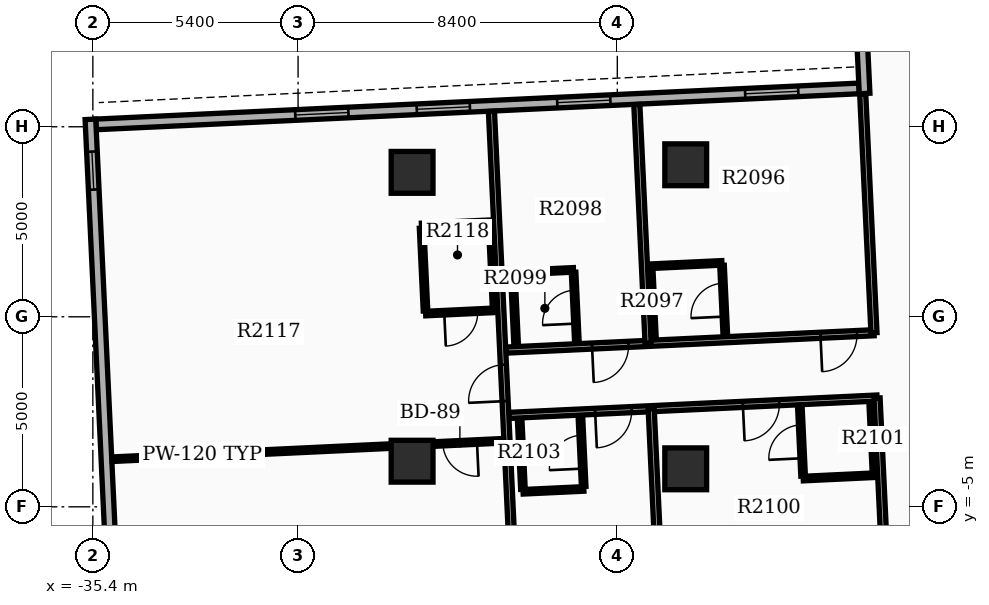
"""IFC4 building model, lengths in metres.
Left out: names, types, materials, properties, quantities, classifications, styles, units other than length and angle.
Written with IfcOpenShell. Run it as: python <this file> out.ifc"""

import sys

from ifc_helpers import new_model, si_unit, direction, frame, frame_2d, origin, origin_2d, place, context, subcontext, project, spatial, rectangle, extrude, element, fill, save


model = new_model("IFC4")
c1 = context("Model", 3, precision=1e-05, world=origin(), true_north=direction((0.0, 1.0)))
c2 = subcontext(c1, "Body", "Model", "MODEL_VIEW")
j1 = project(units=[si_unit("LENGTHUNIT", "METRE"), si_unit("PLANEANGLEUNIT", "RADIAN")], contexts=[c1])
p1 = place(None, origin())
s1 = spatial("IfcSite", under=j1, at=p1, CompositionType="ELEMENT")
p2 = place(p1, origin())
s2 = spatial("IfcBuilding", under=s1, at=p2, CompositionType="ELEMENT")
p3 = place(p2, frame((0.0, 0.0, 132.0)))
s3 = spatial("IfcBuildingStorey", under=s2, at=p3, CompositionType="ELEMENT", Elevation=132.0)
for number, where, z_axis, x_axis in (
    (1, (-19.8, -4.0, 0.0), (0.0, 0.0, 1.0), (1.0, 0.0, 0.0)),
    (2, (-19.8, 4.0, 0.0), (0.0, 0.0, 1.0), (1.0, 0.0, 0.0)),
    (3, (-27.0, -3.8, 0.0), (0.0, 0.0, 1.0), (1.0, 0.0, 0.0)),
    (4, (-27.0, 3.8, 0.0), (0.0, 0.0, 1.0), (1.0, 0.0, 0.0)),
):
    element("IfcColumn", number, at=place(p3, frame(where, z_axis=z_axis, x_axis=x_axis)), inside=s3, PredefinedType="COLUMN", context=c2, shape_type="SweptSolid", body=[
        extrude(rectangle(XDim=1.1, YDim=1.1, at=origin_2d()), origin(), (0.0, 0.0, 1.0), 3.9),
    ])
p4 = place(p3, frame((-15.24, 6.009, 0.0), z_axis=(0.0, 0.0, 1.0), x_axis=(-0.998890015344, -0.047103473814, 0.0)))
e5 = element("IfcWall", 5, at=p4, inside=s3, PredefinedType="STANDARD", context=c2, shape_type="SweptSolid", body=[
    extrude(rectangle(XDim=20.1, YDim=0.28, at=frame_2d((10.05, 0.0))), origin(), (0.0, 0.0, 1.0), 2.97),
])
p5 = place(p4, frame((1.6, 0.0, 0.8)))
e6 = element("IfcOpeningElement", 6, at=p5, cuts=e5, PredefinedType="OPENING", context=c2, shape_type="SweptSolid", body=[
    extrude(rectangle(XDim=1.4, YDim=1.6, at=frame_2d((0.7, 0.8))), frame((0.0, 0.15, 0.0), z_axis=(0.0, -1.0, 0.0), x_axis=(1.0, 0.0, 0.0)), (0.0, 0.0, 1.0), 0.3),
])
p6 = place(p4, frame((6.55, 0.0, 0.8)))
e7 = element("IfcOpeningElement", 7, at=p6, cuts=e5, PredefinedType="OPENING", context=c2, shape_type="SweptSolid", body=[
    extrude(rectangle(XDim=1.4, YDim=1.6, at=frame_2d((0.7, 0.8))), frame((0.0, 0.15, 0.0), z_axis=(0.0, -1.0, 0.0), x_axis=(1.0, 0.0, 0.0)), (0.0, 0.0, 1.0), 0.3),
])
p7 = place(p4, frame((10.25, 0.0, 0.8)))
e8 = element("IfcOpeningElement", 8, at=p7, cuts=e5, PredefinedType="OPENING", context=c2, shape_type="SweptSolid", body=[
    extrude(rectangle(XDim=1.4, YDim=1.6, at=frame_2d((0.7, 0.8))), frame((0.0, 0.15, 0.0), z_axis=(0.0, -1.0, 0.0), x_axis=(1.0, 0.0, 0.0)), (0.0, 0.0, 1.0), 0.3),
])
p8 = place(p4, frame((13.45, 0.0, 0.8)))
e9 = element("IfcOpeningElement", 9, at=p8, cuts=e5, PredefinedType="OPENING", context=c2, shape_type="SweptSolid", body=[
    extrude(rectangle(XDim=1.4, YDim=1.6, at=frame_2d((0.7, 0.8))), frame((0.0, 0.15, 0.0), z_axis=(0.0, -1.0, 0.0), x_axis=(1.0, 0.0, 0.0)), (0.0, 0.0, 1.0), 0.3),
])
p9 = place(p3, frame((-35.464, 5.195, 0.0), z_axis=(0.0, 0.0, 1.0), x_axis=(0.047101845086, -0.998890092147, 0.0)))
e10 = element("IfcWall", 10, at=p9, inside=s3, PredefinedType="STANDARD", context=c2, shape_type="SweptSolid", body=[
    extrude(rectangle(XDim=13.72, YDim=0.28, at=frame_2d((6.86, 0.0))), origin(), (0.0, 0.0, 1.0), 2.97),
])
p10 = place(p9, frame((0.85, 0.0, 0.85)))
e11 = element("IfcOpeningElement", 11, at=p10, cuts=e10, PredefinedType="OPENING", context=c2, shape_type="SweptSolid", body=[
    extrude(rectangle(XDim=1.0, YDim=1.5, at=frame_2d((0.5, 0.75))), frame((0.0, 0.15, 0.0), z_axis=(0.0, -1.0, 0.0), x_axis=(1.0, 0.0, 0.0)), (0.0, 0.0, 1.0), 0.3),
])
p11 = place(p3, frame((-15.094, 5.875, 0.0), z_axis=(0.0, 0.0, 1.0), x_axis=(-0.04712043756, 0.998889215261, 0.0)))
e12 = element("IfcWall", 12, at=p11, inside=s3, PredefinedType="STANDARD", context=c2, shape_type="SweptSolid", body=[
    extrude(rectangle(XDim=6.86, YDim=0.28, at=frame_2d((3.43, 0.0))), origin(), (0.0, 0.0, 1.0), 2.97),
])
p12 = place(p3, frame((-14.847, -0.42, 0.0), z_axis=(0.0, 0.0, 1.0), x_axis=(-0.998890575268, -0.047091598416, 0.0)))
e13 = element("IfcWall", 13, at=p12, inside=s3, PredefinedType="PARTITIONING", context=c2, shape_type="SweptSolid", body=[
    extrude(rectangle(XDim=9.7, YDim=0.16, at=frame_2d((4.85, 0.0))), origin(), (0.0, 0.0, 1.0), 2.96),
])
p13 = place(p12, frame((0.45, 0.0, 0.0)))
e14 = element("IfcOpeningElement", 14, at=p13, cuts=e13, PredefinedType="OPENING", context=c2, shape_type="SweptSolid", body=[
    extrude(rectangle(XDim=0.96, YDim=2.15, at=frame_2d((0.48, 1.075))), frame((0.0, 0.09, 0.0), z_axis=(0.0, -1.0, 0.0), x_axis=(1.0, 0.0, 0.0)), (0.0, 0.0, 1.0), 0.18),
])
p14 = place(p12, frame((6.467, 0.0, 0.0)))
e15 = element("IfcOpeningElement", 15, at=p14, cuts=e13, PredefinedType="OPENING", context=c2, shape_type="SweptSolid", body=[
    extrude(rectangle(XDim=0.96, YDim=2.15, at=frame_2d((0.48, 1.075))), frame((0.0, 0.09, 0.0), z_axis=(0.0, -1.0, 0.0), x_axis=(1.0, 0.0, 0.0)), (0.0, 0.0, 1.0), 0.18),
])
for number, where, z_axis, x_axis in (
    (16, (-14.847, -0.42, 0.0), (0.0, 0.0, 1.0), (-0.047, 0.999, 0.0)),
    (17, (-20.79, -0.7, 0.0), (0.0, 0.0, 1.0), (-0.047, 0.999, 0.0)),
):
    element("IfcWall", number, at=place(p3, frame(where, z_axis=z_axis, x_axis=x_axis)), inside=s3, PredefinedType="PARTITIONING", context=c2, shape_type="SweptSolid", body=[
        extrude(rectangle(XDim=6.292, YDim=0.16, at=frame_2d((3.146, 0.0))), origin(), (0.0, 0.0, 1.0), 2.96),
    ])
p15 = place(p3, frame((-18.759, -0.464, 0.0), z_axis=(0.0, 0.0, 1.0), x_axis=(-0.047087116047, 0.998890786574, 0.0)))
e18 = element("IfcWall", 18, at=p15, inside=s3, PredefinedType="PARTITIONING", context=c2, shape_type="SweptSolid", body=[
    extrude(rectangle(XDim=1.82, YDim=0.12, at=frame_2d((0.91, 0.0))), origin(), (0.0, 0.0, 1.0), 2.96),
])
p16 = place(p15, frame((0.47, 0.0, 0.0)))
e19 = element("IfcOpeningElement", 19, at=p16, cuts=e18, PredefinedType="OPENING", context=c2, shape_type="SweptSolid", body=[
    extrude(rectangle(XDim=0.88, YDim=2.1, at=frame_2d((0.44, 1.05))), frame((0.0, 0.07, 0.0), z_axis=(0.0, -1.0, 0.0), x_axis=(1.0, 0.0, 0.0)), (0.0, 0.0, 1.0), 0.14),
])
p17 = place(p3, frame((-20.637, -0.553, 0.0), z_axis=(0.0, 0.0, 1.0), x_axis=(-0.047087116047, 0.998890786574, 0.0)))
e20 = element("IfcWall", 20, at=p17, inside=s3, PredefinedType="PARTITIONING", context=c2, shape_type="SweptSolid", body=[
    extrude(rectangle(XDim=1.82, YDim=0.12, at=frame_2d((0.91, 0.0))), origin(), (0.0, 0.0, 1.0), 2.96),
])
p18 = place(p3, frame((-18.848, 1.419, 0.0), z_axis=(0.0, 0.0, 1.0), x_axis=(-0.998888030748, -0.047145540913, 0.0)))
e21 = element("IfcWall", 21, at=p18, inside=s3, PredefinedType="PARTITIONING", context=c2, shape_type="SweptSolid", body=[
    extrude(rectangle(XDim=1.88, YDim=0.12, at=frame_2d((0.94, 0.0))), origin(), (0.0, 0.0, 1.0), 2.96),
])
p19 = place(p3, frame((-22.665, -0.648, 0.0), z_axis=(0.0, 0.0, 1.0), x_axis=(-0.047214641863, 0.998884766924, 0.0)))
e22 = element("IfcWall", 22, at=p19, inside=s3, PredefinedType="PARTITIONING", context=c2, shape_type="SweptSolid", body=[
    extrude(rectangle(XDim=1.82, YDim=0.12, at=frame_2d((0.91, 0.0))), origin(), (0.0, 0.0, 1.0), 2.96),
])
p20 = place(p19, frame((0.47, 0.0, 0.0)))
e23 = element("IfcOpeningElement", 23, at=p20, cuts=e22, PredefinedType="OPENING", context=c2, shape_type="SweptSolid", body=[
    extrude(rectangle(XDim=0.88, YDim=2.1, at=frame_2d((0.44, 1.05))), frame((0.0, 0.07, 0.0), z_axis=(0.0, -1.0, 0.0), x_axis=(1.0, 0.0, 0.0)), (0.0, 0.0, 1.0), 0.14),
])
p21 = place(p3, frame((-24.263, -0.724, 0.0), z_axis=(0.0, 0.0, 1.0), x_axis=(-0.047220968666, 0.998884467853, 0.0)))
e24 = element("IfcWall", 24, at=p21, inside=s3, PredefinedType="PARTITIONING", context=c2, shape_type="SweptSolid", body=[
    extrude(rectangle(XDim=1.82, YDim=0.12, at=frame_2d((0.91, 0.0))), origin(), (0.0, 0.0, 1.0), 2.96),
])
p22 = place(p3, frame((-22.753, 1.235, 0.0), z_axis=(0.0, 0.0, 1.0), x_axis=(-0.998887730798, -0.047151895633, 0.0)))
e25 = element("IfcWall", 25, at=p22, inside=s3, PredefinedType="PARTITIONING", context=c2, shape_type="SweptSolid", body=[
    extrude(rectangle(XDim=1.6, YDim=0.12, at=frame_2d((0.8, 0.0))), origin(), (0.0, 0.0, 1.0), 2.96),
])
p23 = place(p3, frame((-14.766, -2.138, 0.0), z_axis=(0.0, 0.0, 1.0), x_axis=(-0.99888939101, -0.047116711769, 0.0)))
e26 = element("IfcWall", 26, at=p23, inside=s3, PredefinedType="PARTITIONING", context=c2, shape_type="SweptSolid", body=[
    extrude(rectangle(XDim=9.7, YDim=0.16, at=frame_2d((4.85, 0.0))), origin(), (0.0, 0.0, 1.0), 2.96),
])
p24 = place(p23, frame((2.575, 0.0, 0.0)))
e27 = element("IfcOpeningElement", 27, at=p24, cuts=e26, PredefinedType="OPENING", context=c2, shape_type="SweptSolid", body=[
    extrude(rectangle(XDim=0.96, YDim=2.15, at=frame_2d((0.48, 1.075))), frame((0.0, 0.09, 0.0), z_axis=(0.0, -1.0, 0.0), x_axis=(1.0, 0.0, 0.0)), (0.0, 0.0, 1.0), 0.18),
])
p25 = place(p23, frame((6.467, 0.0, 0.0)))
e28 = element("IfcOpeningElement", 28, at=p25, cuts=e26, PredefinedType="OPENING", context=c2, shape_type="SweptSolid", body=[
    extrude(rectangle(XDim=0.96, YDim=2.15, at=frame_2d((0.48, 1.075))), frame((0.0, 0.09, 0.0), z_axis=(0.0, -1.0, 0.0), x_axis=(1.0, 0.0, 0.0)), (0.0, 0.0, 1.0), 0.18),
])
p26 = place(p3, frame((-14.766, -2.138, 0.0), z_axis=(0.0, 0.0, 1.0), x_axis=(0.047095033298, -0.998890413328, 0.0)))
e29 = element("IfcWall", 29, at=p26, inside=s3, PredefinedType="PARTITIONING", context=c2, shape_type="SweptSolid", body=[
    extrude(rectangle(XDim=5.132, YDim=0.16, at=frame_2d((2.566, 0.0))), origin(), (0.0, 0.0, 1.0), 2.96),
])
p27 = place(p3, frame((-20.709, -2.418, 0.0), z_axis=(0.0, 0.0, 1.0), x_axis=(0.047097271264, -0.998890307811, 0.0)))
e30 = element("IfcWall", 30, at=p27, inside=s3, PredefinedType="PARTITIONING", context=c2, shape_type="SweptSolid", body=[
    extrude(rectangle(XDim=5.132, YDim=0.16, at=frame_2d((2.566, 0.0))), origin(), (0.0, 0.0, 1.0), 2.96),
])
p28 = place(p3, frame((-16.711, -4.192, 0.0), z_axis=(0.0, 0.0, 1.0), x_axis=(-0.047080807099, 0.998891083954, 0.0)))
e31 = element("IfcWall", 31, at=p28, inside=s3, PredefinedType="PARTITIONING", context=c2, shape_type="SweptSolid", body=[
    extrude(rectangle(XDim=1.82, YDim=0.12, at=frame_2d((0.91, 0.0))), origin(), (0.0, 0.0, 1.0), 2.96),
])
p29 = place(p28, frame((0.47, 0.0, 0.0)))
e32 = element("IfcOpeningElement", 32, at=p29, cuts=e31, PredefinedType="OPENING", context=c2, shape_type="SweptSolid", body=[
    extrude(rectangle(XDim=0.88, YDim=2.1, at=frame_2d((0.44, 1.05))), frame((0.0, 0.07, 0.0), z_axis=(0.0, -1.0, 0.0), x_axis=(1.0, 0.0, 0.0)), (0.0, 0.0, 1.0), 0.14),
])
p30 = place(p3, frame((-14.833, -4.103, 0.0), z_axis=(0.0, 0.0, 1.0), x_axis=(-0.047087116047, 0.998890786574, 0.0)))
e33 = element("IfcWall", 33, at=p30, inside=s3, PredefinedType="PARTITIONING", context=c2, shape_type="SweptSolid", body=[
    extrude(rectangle(XDim=1.82, YDim=0.12, at=frame_2d((0.91, 0.0))), origin(), (0.0, 0.0, 1.0), 2.96),
])
p31 = place(p3, frame((-14.83, -4.168, 0.0), z_axis=(0.0, 0.0, 1.0), x_axis=(-0.998888319371, -0.047139425368, 0.0)))
e34 = element("IfcWall", 34, at=p31, inside=s3, PredefinedType="PARTITIONING", context=c2, shape_type="SweptSolid", body=[
    extrude(rectangle(XDim=1.88, YDim=0.12, at=frame_2d((0.94, 0.0))), origin(), (0.0, 0.0, 1.0), 2.96),
])
p32 = place(p3, frame((-22.485, -4.464, 0.0), z_axis=(0.0, 0.0, 1.0), x_axis=(-0.047080807099, 0.998891083954, 0.0)))
e35 = element("IfcWall", 35, at=p32, inside=s3, PredefinedType="PARTITIONING", context=c2, shape_type="SweptSolid", body=[
    extrude(rectangle(XDim=1.82, YDim=0.12, at=frame_2d((0.91, 0.0))), origin(), (0.0, 0.0, 1.0), 2.96),
])
p33 = place(p32, frame((0.47, 0.0, 0.0)))
e36 = element("IfcOpeningElement", 36, at=p33, cuts=e35, PredefinedType="OPENING", context=c2, shape_type="SweptSolid", body=[
    extrude(rectangle(XDim=0.88, YDim=2.1, at=frame_2d((0.44, 1.05))), frame((0.0, 0.07, 0.0), z_axis=(0.0, -1.0, 0.0), x_axis=(1.0, 0.0, 0.0)), (0.0, 0.0, 1.0), 0.14),
])
p34 = place(p3, frame((-24.083, -4.54, 0.0), z_axis=(0.0, 0.0, 1.0), x_axis=(-0.047080807099, 0.998891083954, 0.0)))
e37 = element("IfcWall", 37, at=p34, inside=s3, PredefinedType="PARTITIONING", context=c2, shape_type="SweptSolid", body=[
    extrude(rectangle(XDim=1.82, YDim=0.12, at=frame_2d((0.91, 0.0))), origin(), (0.0, 0.0, 1.0), 2.96),
])
p35 = place(p3, frame((-22.482, -4.529, 0.0), z_axis=(0.0, 0.0, 1.0), x_axis=(-0.998887730798, -0.047151895633, 0.0)))
e38 = element("IfcWall", 38, at=p35, inside=s3, PredefinedType="PARTITIONING", context=c2, shape_type="SweptSolid", body=[
    extrude(rectangle(XDim=1.6, YDim=0.12, at=frame_2d((0.8, 0.0))), origin(), (0.0, 0.0, 1.0), 2.96),
])
p36 = place(p3, frame((-24.293, -7.725, 0.0), z_axis=(0.0, 0.0, 1.0), x_axis=(-0.047104484326, 0.998889967692, 0.0)))
e39 = element("IfcWall", 39, at=p36, inside=s3, PredefinedType="PARTITIONING", context=c2, shape_type="SweptSolid", body=[
    extrude(rectangle(XDim=13.144, YDim=0.16, at=frame_2d((6.572, 0.0))), origin(), (0.0, 0.0, 1.0), 2.96),
])
p37 = place(p36, frame((5.512, 0.0, 0.0)))
e40 = element("IfcOpeningElement", 40, at=p37, cuts=e39, PredefinedType="OPENING", context=c2, shape_type="SweptSolid", body=[
    extrude(rectangle(XDim=0.96, YDim=2.15, at=frame_2d((0.48, 1.075))), frame((0.0, 0.09, 0.0), z_axis=(0.0, -1.0, 0.0), x_axis=(1.0, 0.0, 0.0)), (0.0, 0.0, 1.0), 0.18),
])
p38 = place(p3, frame((-24.594, -3.262, 0.0), z_axis=(0.0, 0.0, 1.0), x_axis=(-0.998890681588, -0.047089343138, 0.0)))
e41 = element("IfcWall", 41, at=p38, inside=s3, PredefinedType="PARTITIONING", context=c2, shape_type="SweptSolid", body=[
    extrude(rectangle(XDim=10.312, YDim=0.12, at=frame_2d((5.156, 0.0))), origin(), (0.0, 0.0, 1.0), 2.96),
])
p39 = place(p38, frame((0.7, 0.0, 0.0)))
e42 = element("IfcOpeningElement", 42, at=p39, cuts=e41, PredefinedType="OPENING", context=c2, shape_type="SweptSolid", body=[
    extrude(rectangle(XDim=0.9, YDim=2.1, at=frame_2d((0.45, 1.05))), frame((0.0, 0.07, 0.0), z_axis=(0.0, -1.0, 0.0), x_axis=(1.0, 0.0, 0.0)), (0.0, 0.0, 1.0), 0.14),
])
p40 = place(p3, frame((-24.829, 0.241, 0.0), z_axis=(0.0, 0.0, 1.0), x_axis=(-0.047150103183, 0.998887815408, 0.0)))
e43 = element("IfcWall", 43, at=p40, inside=s3, PredefinedType="PARTITIONING", context=c2, shape_type="SweptSolid", body=[
    extrude(rectangle(XDim=2.18, YDim=0.12, at=frame_2d((1.09, 0.0))), origin(), (0.0, 0.0, 1.0), 2.96),
])
p41 = place(p3, frame((-26.647, 0.155, 0.0), z_axis=(0.0, 0.0, 1.0), x_axis=(-0.047033094092, 0.998893331673, 0.0)))
e44 = element("IfcWall", 44, at=p41, inside=s3, PredefinedType="PARTITIONING", context=c2, shape_type="SweptSolid", body=[
    extrude(rectangle(XDim=2.18, YDim=0.12, at=frame_2d((1.09, 0.0))), origin(), (0.0, 0.0, 1.0), 2.96),
])
p42 = place(p3, frame((-24.826, 0.171, 0.0), z_axis=(0.0, 0.0, 1.0), x_axis=(-0.998890786574, -0.047087116047, 0.0)))
e45 = element("IfcWall", 45, at=p42, inside=s3, PredefinedType="PARTITIONING", context=c2, shape_type="SweptSolid", body=[
    extrude(rectangle(XDim=1.82, YDim=0.12, at=frame_2d((0.91, 0.0))), origin(), (0.0, 0.0, 1.0), 2.96),
])
p43 = place(p42, frame((0.45, 0.0, 0.0)))
e46 = element("IfcOpeningElement", 46, at=p43, cuts=e45, PredefinedType="OPENING", context=c2, shape_type="SweptSolid", body=[
    extrude(rectangle(XDim=0.88, YDim=2.1, at=frame_2d((0.44, 1.05))), frame((0.0, 0.07, 0.0), z_axis=(0.0, -1.0, 0.0), x_axis=(1.0, 0.0, 0.0)), (0.0, 0.0, 1.0), 0.14),
])
p44 = place(p3, frame((-24.935, 2.488, 0.0), z_axis=(0.0, 0.0, 1.0), x_axis=(-0.998884766924, -0.047214641863, 0.0)))
e47 = element("IfcWall", 47, at=p44, inside=s3, PredefinedType="PARTITIONING", context=c2, shape_type="SweptSolid", body=[
    extrude(rectangle(XDim=1.82, YDim=0.12, at=frame_2d((0.91, 0.0))), origin(), (0.0, 0.0, 1.0), 2.96),
])
p45 = place(p5, origin())
e48 = element("IfcWindow", 48, at=p45, inside=s3, PartitioningType="SINGLE_PANEL", PredefinedType="WINDOW", context=c2, shape_type="SweptSolid", body=[
    extrude(rectangle(XDim=1.4, YDim=1.6, at=frame_2d((0.7, 0.8))), frame((0.0, 0.03, 0.0), z_axis=(0.0, -1.0, 0.0), x_axis=(1.0, 0.0, 0.0)), (0.0, 0.0, 1.0), 0.06),
])
fill(e6, e48)
p46 = place(p6, origin())
e49 = element("IfcWindow", 49, at=p46, inside=s3, PartitioningType="SINGLE_PANEL", PredefinedType="WINDOW", context=c2, shape_type="SweptSolid", body=[
    extrude(rectangle(XDim=1.4, YDim=1.6, at=frame_2d((0.7, 0.8))), frame((0.0, 0.03, 0.0), z_axis=(0.0, -1.0, 0.0), x_axis=(1.0, 0.0, 0.0)), (0.0, 0.0, 1.0), 0.06),
])
fill(e7, e49)
p47 = place(p7, origin())
e50 = element("IfcWindow", 50, at=p47, inside=s3, PartitioningType="SINGLE_PANEL", PredefinedType="WINDOW", context=c2, shape_type="SweptSolid", body=[
    extrude(rectangle(XDim=1.4, YDim=1.6, at=frame_2d((0.7, 0.8))), frame((0.0, 0.03, 0.0), z_axis=(0.0, -1.0, 0.0), x_axis=(1.0, 0.0, 0.0)), (0.0, 0.0, 1.0), 0.06),
])
fill(e8, e50)
p48 = place(p8, origin())
e51 = element("IfcWindow", 51, at=p48, inside=s3, PartitioningType="SINGLE_PANEL", PredefinedType="WINDOW", context=c2, shape_type="SweptSolid", body=[
    extrude(rectangle(XDim=1.4, YDim=1.6, at=frame_2d((0.7, 0.8))), frame((0.0, 0.03, 0.0), z_axis=(0.0, -1.0, 0.0), x_axis=(1.0, 0.0, 0.0)), (0.0, 0.0, 1.0), 0.06),
])
fill(e9, e51)
p49 = place(p10, origin())
e52 = element("IfcWindow", 52, at=p49, inside=s3, PartitioningType="SINGLE_PANEL", PredefinedType="WINDOW", context=c2, shape_type="SweptSolid", body=[
    extrude(rectangle(XDim=1.0, YDim=1.5, at=frame_2d((0.5, 0.75))), frame((0.0, 0.03, 0.0), z_axis=(0.0, -1.0, 0.0), x_axis=(1.0, 0.0, 0.0)), (0.0, 0.0, 1.0), 0.06),
])
fill(e11, e52)
p50 = place(p13, origin())
e53 = element("IfcDoor", 53, at=p50, inside=s3, OperationType="SINGLE_SWING_RIGHT", PredefinedType="DOOR", context=c2, shape_type="SweptSolid", body=[
    extrude(rectangle(XDim=0.96, YDim=2.15, at=frame_2d((0.48, 1.075))), frame((0.0, 0.025, 0.0), z_axis=(0.0, -1.0, 0.0), x_axis=(1.0, 0.0, 0.0)), (0.0, 0.0, 1.0), 0.05),
])
fill(e14, e53)
p51 = place(p16, origin())
e54 = element("IfcDoor", 54, at=p51, inside=s3, OperationType="SINGLE_SWING_LEFT", PredefinedType="DOOR", context=c2, shape_type="SweptSolid", body=[
    extrude(rectangle(XDim=0.88, YDim=2.1, at=frame_2d((0.44, 1.05))), frame((0.0, 0.025, 0.0), z_axis=(0.0, -1.0, 0.0), x_axis=(1.0, 0.0, 0.0)), (0.0, 0.0, 1.0), 0.05),
])
fill(e19, e54)
p52 = place(p14, origin())
e55 = element("IfcDoor", 55, at=p52, inside=s3, OperationType="SINGLE_SWING_RIGHT", PredefinedType="DOOR", context=c2, shape_type="SweptSolid", body=[
    extrude(rectangle(XDim=0.96, YDim=2.15, at=frame_2d((0.48, 1.075))), frame((0.0, 0.025, 0.0), z_axis=(0.0, -1.0, 0.0), x_axis=(1.0, 0.0, 0.0)), (0.0, 0.0, 1.0), 0.05),
])
fill(e15, e55)
p53 = place(p20, origin())
e56 = element("IfcDoor", 56, at=p53, inside=s3, OperationType="SINGLE_SWING_LEFT", PredefinedType="DOOR", context=c2, shape_type="SweptSolid", body=[
    extrude(rectangle(XDim=0.88, YDim=2.1, at=frame_2d((0.44, 1.05))), frame((0.0, 0.025, 0.0), z_axis=(0.0, -1.0, 0.0), x_axis=(1.0, 0.0, 0.0)), (0.0, 0.0, 1.0), 0.05),
])
fill(e23, e56)
p54 = place(p24, origin())
e57 = element("IfcDoor", 57, at=p54, inside=s3, OperationType="SINGLE_SWING_RIGHT", PredefinedType="DOOR", context=c2, shape_type="SweptSolid", body=[
    extrude(rectangle(XDim=0.96, YDim=2.15, at=frame_2d((0.48, 1.075))), frame((0.0, 0.025, 0.0), z_axis=(0.0, -1.0, 0.0), x_axis=(1.0, 0.0, 0.0)), (0.0, 0.0, 1.0), 0.05),
])
fill(e27, e57)
p55 = place(p29, origin())
e58 = element("IfcDoor", 58, at=p55, inside=s3, OperationType="SINGLE_SWING_LEFT", PredefinedType="DOOR", context=c2, shape_type="SweptSolid", body=[
    extrude(rectangle(XDim=0.88, YDim=2.1, at=frame_2d((0.44, 1.05))), frame((0.0, 0.025, 0.0), z_axis=(0.0, -1.0, 0.0), x_axis=(1.0, 0.0, 0.0)), (0.0, 0.0, 1.0), 0.05),
])
fill(e32, e58)
p56 = place(p25, origin())
e59 = element("IfcDoor", 59, at=p56, inside=s3, OperationType="SINGLE_SWING_RIGHT", PredefinedType="DOOR", context=c2, shape_type="SweptSolid", body=[
    extrude(rectangle(XDim=0.96, YDim=2.15, at=frame_2d((0.48, 1.075))), frame((0.0, 0.025, 0.0), z_axis=(0.0, -1.0, 0.0), x_axis=(1.0, 0.0, 0.0)), (0.0, 0.0, 1.0), 0.05),
])
fill(e28, e59)
p57 = place(p33, origin())
e60 = element("IfcDoor", 60, at=p57, inside=s3, OperationType="SINGLE_SWING_LEFT", PredefinedType="DOOR", context=c2, shape_type="SweptSolid", body=[
    extrude(rectangle(XDim=0.88, YDim=2.1, at=frame_2d((0.44, 1.05))), frame((0.0, 0.025, 0.0), z_axis=(0.0, -1.0, 0.0), x_axis=(1.0, 0.0, 0.0)), (0.0, 0.0, 1.0), 0.05),
])
fill(e36, e60)
p58 = place(p37, origin())
e61 = element("IfcDoor", 61, at=p58, inside=s3, OperationType="SINGLE_SWING_LEFT", PredefinedType="DOOR", context=c2, shape_type="SweptSolid", body=[
    extrude(rectangle(XDim=0.96, YDim=2.15, at=frame_2d((0.48, 1.075))), frame((0.0, 0.025, 0.0), z_axis=(0.0, -1.0, 0.0), x_axis=(1.0, 0.0, 0.0)), (0.0, 0.0, 1.0), 0.05),
])
fill(e40, e61)
p59 = place(p39, origin())
e62 = element("IfcDoor", 62, at=p59, inside=s3, OperationType="SINGLE_SWING_LEFT", PredefinedType="DOOR", context=c2, shape_type="SweptSolid", body=[
    extrude(rectangle(XDim=0.9, YDim=2.1, at=frame_2d((0.45, 1.05))), frame((0.0, 0.025, 0.0), z_axis=(0.0, -1.0, 0.0), x_axis=(1.0, 0.0, 0.0)), (0.0, 0.0, 1.0), 0.05),
])
fill(e42, e62)
p60 = place(p43, origin())
e63 = element("IfcDoor", 63, at=p60, inside=s3, OperationType="SINGLE_SWING_RIGHT", PredefinedType="DOOR", context=c2, shape_type="SweptSolid", body=[
    extrude(rectangle(XDim=0.88, YDim=2.1, at=frame_2d((0.44, 1.05))), frame((0.0, 0.025, 0.0), z_axis=(0.0, -1.0, 0.0), x_axis=(1.0, 0.0, 0.0)), (0.0, 0.0, 1.0), 0.05),
])
fill(e46, e63)
save(model, sys.argv[1])
